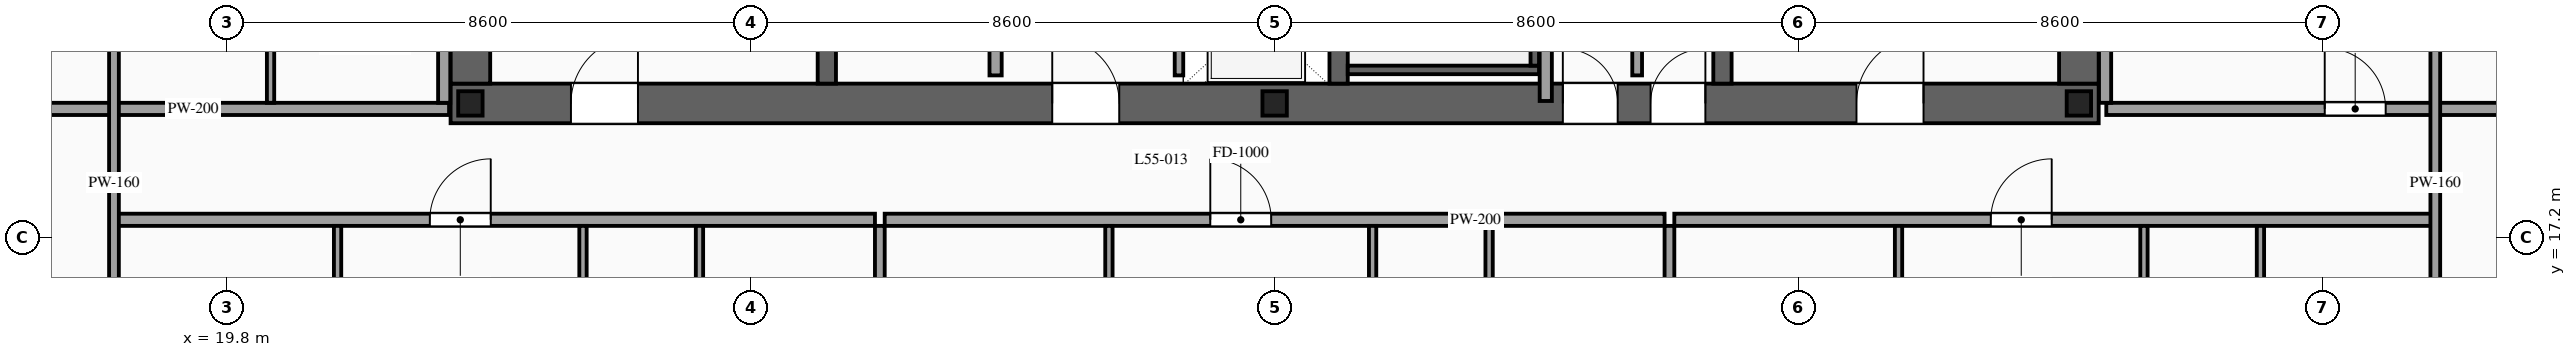
"""IFC4 building model, lengths in metres.
Left out: names, types, materials, properties, quantities, classifications, styles, units other than length and angle.
Written with IfcOpenShell. Run it as: python <this file> out.ifc"""

import sys

from ifc_helpers import new_model, si_unit, direction, frame, frame_2d, origin, origin_2d, place, context, subcontext, project, spatial, rectangle, i_section, extrude, source, transform, mapped, element, fill, save


model = new_model("IFC4")
c1 = context("Model", 3, precision=1e-05, world=origin(), true_north=direction((0.0, 1.0)))
c2 = subcontext(c1, "Body", "Model", "MODEL_VIEW")
j1 = project(units=[si_unit("LENGTHUNIT", "METRE"), si_unit("PLANEANGLEUNIT", "RADIAN")], contexts=[c1])
p1 = place(None, origin())
s1 = spatial("IfcSite", under=j1, at=p1, CompositionType="ELEMENT")
p2 = place(p1, origin())
s2 = spatial("IfcBuilding", under=s1, at=p2, CompositionType="ELEMENT")
p3 = place(p2, frame((0.0, 0.0, 209.0)))
s3 = spatial("IfcBuildingStorey", under=s2, at=p3, CompositionType="ELEMENT", Elevation=209.0)
p4 = place(p3, frame((23.475, 19.4, 0.0), z_axis=(0.0, 0.0, 1.0), x_axis=(1.0, 0.0, 0.0)))
e1 = element("IfcWall", 1, at=p4, inside=s3, PredefinedType="SHEAR", context=c2, shape_type="SweptSolid", body=[
    extrude(rectangle(XDim=27.05, YDim=0.65, at=frame_2d((13.525, 0.0))), origin(), (0.0, 0.0, 1.0), 3.5),
])
p5 = place(p4, frame((1.975, 0.0, 0.0)))
e2 = element("IfcOpeningElement", 2, at=p5, cuts=e1, PredefinedType="OPENING", context=c2, shape_type="SweptSolid", body=[
    extrude(rectangle(XDim=1.1, YDim=2.2, at=frame_2d((0.55, 1.1))), frame((0.0, 0.34, 0.0), z_axis=(0.0, -1.0, 0.0), x_axis=(1.0, 0.0, 0.0)), (0.0, 0.0, 1.0), 0.68),
])
p6 = place(p4, frame((9.875, 0.0, 0.0)))
e3 = element("IfcOpeningElement", 3, at=p6, cuts=e1, PredefinedType="OPENING", context=c2, shape_type="SweptSolid", body=[
    extrude(rectangle(XDim=1.1, YDim=2.2, at=frame_2d((0.55, 1.1))), frame((0.0, 0.34, 0.0), z_axis=(0.0, -1.0, 0.0), x_axis=(1.0, 0.0, 0.0)), (0.0, 0.0, 1.0), 0.68),
])
p7 = place(p4, frame((23.075, 0.0, 0.0)))
e4 = element("IfcOpeningElement", 4, at=p7, cuts=e1, PredefinedType="OPENING", context=c2, shape_type="SweptSolid", body=[
    extrude(rectangle(XDim=1.1, YDim=2.2, at=frame_2d((0.55, 1.1))), frame((0.0, 0.34, 0.0), z_axis=(0.0, -1.0, 0.0), x_axis=(1.0, 0.0, 0.0)), (0.0, 0.0, 1.0), 0.68),
])
p8 = place(p4, frame((19.695, 0.0, 0.0)))
e5 = element("IfcOpeningElement", 5, at=p8, cuts=e1, PredefinedType="OPENING", context=c2, shape_type="SweptSolid", body=[
    extrude(rectangle(XDim=0.9, YDim=2.15, at=frame_2d((0.45, 1.075))), frame((0.0, 0.34, 0.0), z_axis=(0.0, -1.0, 0.0), x_axis=(1.0, 0.0, 0.0)), (0.0, 0.0, 1.0), 0.68),
])
p9 = place(p4, frame((18.255, 0.0, 0.0)))
e6 = element("IfcOpeningElement", 6, at=p9, cuts=e1, PredefinedType="OPENING", context=c2, shape_type="SweptSolid", body=[
    extrude(rectangle(XDim=0.9, YDim=2.15, at=frame_2d((0.45, 1.075))), frame((0.0, 0.34, 0.0), z_axis=(0.0, -1.0, 0.0), x_axis=(1.0, 0.0, 0.0)), (0.0, 0.0, 1.0), 0.68),
])
m1 = source(origin(), c2, "Body", "SweptSolid", [
    extrude(rectangle(XDim=12.15, YDim=0.65, at=frame_2d((6.075, 0.0))), origin(), (0.0, 0.0, 1.0), 3.5),
])
for number, where, z_axis, x_axis in (
    (7, (23.8, 19.725, 0.0), (0.0, 0.0, 1.0), (0.0, 1.0, 0.0)),
    (8, (50.2, 19.725, 0.0), (0.0, 0.0, 1.0), (0.0, 1.0, 0.0)),
):
    element("IfcWall", number, at=place(p3, frame(where, z_axis=z_axis, x_axis=x_axis)), inside=s3, PredefinedType="SHEAR", context=c2, shape_type="MappedRepresentation", body=[
        mapped(m1, transform((0.0, 0.0, 0.0), scale=1.0)),
    ])
m2 = source(origin(), c2, "Body", "SweptSolid", [
    extrude(rectangle(XDim=12.15, YDim=0.3, at=frame_2d((6.075, 0.0))), origin(), (0.0, 0.0, 1.0), 3.5),
])
for number, where, z_axis, x_axis in (
    (9, (29.65, 19.725, 0.0), (0.0, 0.0, 1.0), (0.0, 1.0, 0.0)),
    (10, (38.05, 19.725, 0.0), (0.0, 0.0, 1.0), (0.0, 1.0, 0.0)),
    (11, (44.35, 19.725, 0.0), (0.0, 0.0, 1.0), (0.0, 1.0, 0.0)),
):
    element("IfcWall", number, at=place(p3, frame(where, z_axis=z_axis, x_axis=x_axis)), inside=s3, PredefinedType="SOLIDWALL", context=c2, shape_type="MappedRepresentation", body=[
        mapped(m2, transform((0.0, 0.0, 0.0), scale=1.0)),
    ])
m3 = source(origin(), c2, "Body", "SweptSolid", [
    extrude(i_section(OverallWidth=0.4, OverallDepth=0.4, WebThickness=0.013, FlangeThickness=0.021, at=origin_2d()), origin(), (0.0, 0.0, 1.0), 3.5),
])
for number, where, z_axis, x_axis in (
    (12, (23.8, 19.4, 0.0), (0.0, 0.0, 1.0), (1.0, 0.0, 0.0)),
    (13, (37.0, 19.4, 0.0), (0.0, 0.0, 1.0), (1.0, 0.0, 0.0)),
    (14, (50.2, 19.4, 0.0), (0.0, 0.0, 1.0), (1.0, 0.0, 0.0)),
):
    element("IfcColumn", number, at=place(p3, frame(where, z_axis=z_axis, x_axis=x_axis)), inside=s3, PredefinedType="COLUMN", context=c2, shape_type="MappedRepresentation", body=[
        mapped(m3, transform((0.0, 0.0, 0.0), scale=1.0)),
    ])
p10 = place(p3, frame((35.43, 19.86, 0.0), z_axis=(0.0, 0.0, 1.0), x_axis=(0.0, 1.0, 0.0)))
e15 = element("IfcWall", 15, at=p10, inside=s3, PredefinedType="SOLIDWALL", context=c2, shape_type="SweptSolid", body=[
    extrude(rectangle(XDim=2.04, YDim=0.14, at=frame_2d((1.02, 0.0))), origin(), (0.0, 0.0, 1.0), 3.28),
])
p11 = place(p10, frame((0.47, 0.0, 0.0)))
e16 = element("IfcOpeningElement", 16, at=p11, cuts=e15, PredefinedType="OPENING", context=c2, shape_type="SweptSolid", body=[
    extrude(rectangle(XDim=1.1, YDim=2.2, at=frame_2d((0.55, 1.1))), frame((0.0, 0.085, 0.0), z_axis=(0.0, -1.0, 0.0), x_axis=(1.0, 0.0, 0.0)), (0.0, 0.0, 1.0), 0.17),
])
m4 = source(origin(), c2, "Body", "SweptSolid", [
    extrude(rectangle(XDim=3.14, YDim=0.14, at=frame_2d((1.57, 0.0))), origin(), (0.0, 0.0, 1.0), 3.28),
])
p12 = place(p3, frame((38.2, 19.95, 0.0), z_axis=(0.0, 0.0, 1.0), x_axis=(1.0, 0.0, 0.0)))
e17 = element("IfcWall", 17, at=p12, inside=s3, PredefinedType="SOLIDWALL", context=c2, shape_type="MappedRepresentation", body=[
    mapped(m4, transform((0.0, 0.0, 0.0), scale=1.0)),
])
m5 = source(origin(), c2, "Body", "SweptSolid", [
    extrude(rectangle(XDim=8.94, YDim=0.14, at=frame_2d((4.47, 0.0))), origin(), (0.0, 0.0, 1.0), 3.28),
])
p13 = place(p3, frame((41.27, 20.02, 0.0), z_axis=(0.0, 0.0, 1.0), x_axis=(0.0, 1.0, 0.0)))
e18 = element("IfcWall", 18, at=p13, inside=s3, PredefinedType="SOLIDWALL", context=c2, shape_type="MappedRepresentation", body=[
    mapped(m5, transform((0.0, 0.0, 0.0), scale=1.0)),
])
p14 = place(p3, frame((32.42, 19.86, 0.0), z_axis=(0.0, 0.0, 1.0), x_axis=(0.0, 1.0, 0.0)))
e19 = element("IfcWall", 19, at=p14, inside=s3, PredefinedType="PARTITIONING", context=c2, shape_type="SweptSolid", body=[
    extrude(rectangle(XDim=11.88, YDim=0.2, at=frame_2d((5.94, 0.0))), origin(), (0.0, 0.0, 1.0), 3.28),
])
p15 = place(p14, frame((5.49, 0.0, 0.0)))
e20 = element("IfcOpeningElement", 20, at=p15, cuts=e19, PredefinedType="OPENING", context=c2, shape_type="SweptSolid", body=[
    extrude(rectangle(XDim=0.9, YDim=2.15, at=frame_2d((0.45, 1.075))), frame((0.0, 0.115, 0.0), z_axis=(0.0, -1.0, 0.0), x_axis=(1.0, 0.0, 0.0)), (0.0, 0.0, 1.0), 0.23),
])
m6 = source(origin(), c2, "Body", "SweptSolid", [
    extrude(rectangle(XDim=1.34, YDim=0.16, at=frame_2d((0.67, 0.0))), origin(), (0.0, 0.0, 1.0), 3.28),
])
p16 = place(p3, frame((42.95, 19.86, 0.0), z_axis=(0.0, 0.0, 1.0), x_axis=(0.0, 1.0, 0.0)))
e21 = element("IfcWall", 21, at=p16, inside=s3, PredefinedType="PARTITIONING", context=c2, shape_type="MappedRepresentation", body=[
    mapped(m6, transform((0.0, 0.0, 0.0), scale=1.0)),
])
m7 = source(origin(), c2, "Body", "SweptSolid", [
    extrude(rectangle(XDim=12.72, YDim=0.2, at=frame_2d((6.36, 0.0))), origin(), (0.0, 0.0, 1.0), 3.28),
])
p17 = place(p3, frame((41.45, 19.44, 0.0), z_axis=(0.0, 0.0, 1.0), x_axis=(0.0, 1.0, 0.0)))
e22 = element("IfcWall", 22, at=p17, inside=s3, PredefinedType="PARTITIONING", context=c2, shape_type="MappedRepresentation", body=[
    mapped(m7, transform((0.0, 0.0, 0.0), scale=1.0)),
])
p18 = place(p3, frame((17.94, 17.49, 0.0), z_axis=(0.0, 0.0, 1.0), x_axis=(1.0, 0.0, 0.0)))
e23 = element("IfcWall", 23, at=p18, inside=s3, PredefinedType="PARTITIONING", context=c2, shape_type="SweptSolid", body=[
    extrude(rectangle(XDim=12.5, YDim=0.2, at=frame_2d((6.25, 0.0))), origin(), (0.0, 0.0, 1.0), 3.28),
])
p19 = place(p18, frame((5.194, 0.0, 0.0)))
e24 = element("IfcOpeningElement", 24, at=p19, cuts=e23, PredefinedType="OPENING", context=c2, shape_type="SweptSolid", body=[
    extrude(rectangle(XDim=1.0, YDim=2.2, at=frame_2d((0.5, 1.1))), frame((0.0, 0.115, 0.0), z_axis=(0.0, -1.0, 0.0), x_axis=(1.0, 0.0, 0.0)), (0.0, 0.0, 1.0), 0.23),
])
m8 = source(origin(), c2, "Body", "SweptSolid", [
    extrude(rectangle(XDim=13.54, YDim=0.16, at=frame_2d((6.77, 0.0))), origin(), (0.0, 0.0, 1.0), 3.28),
])
p20 = place(p3, frame((30.52, 3.85, 0.0), z_axis=(0.0, 0.0, 1.0), x_axis=(0.0, 1.0, 0.0)))
e25 = element("IfcWall", 25, at=p20, inside=s3, PredefinedType="PARTITIONING", context=c2, shape_type="MappedRepresentation", body=[
    mapped(m8, transform((0.0, 0.0, 0.0), scale=1.0)),
])
m9 = source(origin(), c2, "Body", "SweptSolid", [
    extrude(rectangle(XDim=5.61, YDim=0.12, at=frame_2d((2.805, 0.0))), origin(), (0.0, 0.0, 1.0), 3.28),
])
p21 = place(p3, frame((21.62, 11.78, 0.0), z_axis=(0.0, 0.0, 1.0), x_axis=(0.0, 1.0, 0.0)))
e26 = element("IfcWall", 26, at=p21, inside=s3, PredefinedType="PARTITIONING", context=c2, shape_type="MappedRepresentation", body=[
    mapped(m9, transform((0.0, 0.0, 0.0), scale=1.0)),
])
p22 = place(p3, frame((27.56, 11.78, 0.0), z_axis=(0.0, 0.0, 1.0), x_axis=(0.0, 1.0, 0.0)))
e27 = element("IfcWall", 27, at=p22, inside=s3, PredefinedType="PARTITIONING", context=c2, shape_type="SweptSolid", body=[
    extrude(rectangle(XDim=5.61, YDim=0.12, at=frame_2d((2.805, 0.0))), origin(), (0.0, 0.0, 1.0), 3.28),
])
p23 = place(p22, frame((2.38, 0.0, 0.0)))
e28 = element("IfcOpeningElement", 28, at=p23, cuts=e27, PredefinedType="OPENING", context=c2, shape_type="SweptSolid", body=[
    extrude(rectangle(XDim=0.85, YDim=2.1, at=frame_2d((0.425, 1.05))), frame((0.0, 0.075, 0.0), z_axis=(0.0, -1.0, 0.0), x_axis=(1.0, 0.0, 0.0)), (0.0, 0.0, 1.0), 0.15),
])
p24 = place(p3, frame((25.648, 11.78, 0.0), z_axis=(0.0, 0.0, 1.0), x_axis=(0.0, 1.0, 0.0)))
e29 = element("IfcWall", 29, at=p24, inside=s3, PredefinedType="PARTITIONING", context=c2, shape_type="SweptSolid", body=[
    extrude(rectangle(XDim=5.61, YDim=0.12, at=frame_2d((2.805, 0.0))), origin(), (0.0, 0.0, 1.0), 3.28),
])
p25 = place(p24, frame((2.38, 0.0, 0.0)))
e30 = element("IfcOpeningElement", 30, at=p25, cuts=e29, PredefinedType="OPENING", context=c2, shape_type="SweptSolid", body=[
    extrude(rectangle(XDim=0.85, YDim=2.1, at=frame_2d((0.425, 1.05))), frame((0.0, 0.075, 0.0), z_axis=(0.0, -1.0, 0.0), x_axis=(1.0, 0.0, 0.0)), (0.0, 0.0, 1.0), 0.15),
])
p26 = place(p3, frame((30.6, 17.49, 0.0), z_axis=(0.0, 0.0, 1.0), x_axis=(1.0, 0.0, 0.0)))
e31 = element("IfcWall", 31, at=p26, inside=s3, PredefinedType="PARTITIONING", context=c2, shape_type="SweptSolid", body=[
    extrude(rectangle(XDim=12.8, YDim=0.2, at=frame_2d((6.4, 0.0))), origin(), (0.0, 0.0, 1.0), 3.28),
])
p27 = place(p26, frame((5.344, 0.0, 0.0)))
e32 = element("IfcOpeningElement", 32, at=p27, cuts=e31, PredefinedType="OPENING", context=c2, shape_type="SweptSolid", body=[
    extrude(rectangle(XDim=1.0, YDim=2.2, at=frame_2d((0.5, 1.1))), frame((0.0, 0.115, 0.0), z_axis=(0.0, -1.0, 0.0), x_axis=(1.0, 0.0, 0.0)), (0.0, 0.0, 1.0), 0.23),
])
p28 = place(p3, frame((43.48, 3.85, 0.0), z_axis=(0.0, 0.0, 1.0), x_axis=(0.0, 1.0, 0.0)))
e33 = element("IfcWall", 33, at=p28, inside=s3, PredefinedType="PARTITIONING", context=c2, shape_type="MappedRepresentation", body=[
    mapped(m8, transform((0.0, 0.0, 0.0), scale=1.0)),
])
p29 = place(p3, frame((34.28, 11.78, 0.0), z_axis=(0.0, 0.0, 1.0), x_axis=(0.0, 1.0, 0.0)))
e34 = element("IfcWall", 34, at=p29, inside=s3, PredefinedType="PARTITIONING", context=c2, shape_type="MappedRepresentation", body=[
    mapped(m9, transform((0.0, 0.0, 0.0), scale=1.0)),
])
p30 = place(p3, frame((40.52, 11.78, 0.0), z_axis=(0.0, 0.0, 1.0), x_axis=(0.0, 1.0, 0.0)))
e35 = element("IfcWall", 35, at=p30, inside=s3, PredefinedType="PARTITIONING", context=c2, shape_type="SweptSolid", body=[
    extrude(rectangle(XDim=5.61, YDim=0.12, at=frame_2d((2.805, 0.0))), origin(), (0.0, 0.0, 1.0), 3.28),
])
p31 = place(p30, frame((2.38, 0.0, 0.0)))
e36 = element("IfcOpeningElement", 36, at=p31, cuts=e35, PredefinedType="OPENING", context=c2, shape_type="SweptSolid", body=[
    extrude(rectangle(XDim=0.85, YDim=2.1, at=frame_2d((0.425, 1.05))), frame((0.0, 0.075, 0.0), z_axis=(0.0, -1.0, 0.0), x_axis=(1.0, 0.0, 0.0)), (0.0, 0.0, 1.0), 0.15),
])
p32 = place(p3, frame((38.608, 11.78, 0.0), z_axis=(0.0, 0.0, 1.0), x_axis=(0.0, 1.0, 0.0)))
e37 = element("IfcWall", 37, at=p32, inside=s3, PredefinedType="PARTITIONING", context=c2, shape_type="SweptSolid", body=[
    extrude(rectangle(XDim=5.61, YDim=0.12, at=frame_2d((2.805, 0.0))), origin(), (0.0, 0.0, 1.0), 3.28),
])
p33 = place(p32, frame((2.38, 0.0, 0.0)))
e38 = element("IfcOpeningElement", 38, at=p33, cuts=e37, PredefinedType="OPENING", context=c2, shape_type="SweptSolid", body=[
    extrude(rectangle(XDim=0.85, YDim=2.1, at=frame_2d((0.425, 1.05))), frame((0.0, 0.075, 0.0), z_axis=(0.0, -1.0, 0.0), x_axis=(1.0, 0.0, 0.0)), (0.0, 0.0, 1.0), 0.15),
])
p34 = place(p3, frame((43.56, 17.49, 0.0), z_axis=(0.0, 0.0, 1.0), x_axis=(1.0, 0.0, 0.0)))
e39 = element("IfcWall", 39, at=p34, inside=s3, PredefinedType="PARTITIONING", context=c2, shape_type="SweptSolid", body=[
    extrude(rectangle(XDim=12.5, YDim=0.2, at=frame_2d((6.25, 0.0))), origin(), (0.0, 0.0, 1.0), 3.28),
])
p35 = place(p34, frame((5.194, 0.0, 0.0)))
e40 = element("IfcOpeningElement", 40, at=p35, cuts=e39, PredefinedType="OPENING", context=c2, shape_type="SweptSolid", body=[
    extrude(rectangle(XDim=1.0, YDim=2.2, at=frame_2d((0.5, 1.1))), frame((0.0, 0.115, 0.0), z_axis=(0.0, -1.0, 0.0), x_axis=(1.0, 0.0, 0.0)), (0.0, 0.0, 1.0), 0.23),
])
p36 = place(p3, frame((47.24, 11.78, 0.0), z_axis=(0.0, 0.0, 1.0), x_axis=(0.0, 1.0, 0.0)))
e41 = element("IfcWall", 41, at=p36, inside=s3, PredefinedType="PARTITIONING", context=c2, shape_type="MappedRepresentation", body=[
    mapped(m9, transform((0.0, 0.0, 0.0), scale=1.0)),
])
p37 = place(p3, frame((53.18, 11.78, 0.0), z_axis=(0.0, 0.0, 1.0), x_axis=(0.0, 1.0, 0.0)))
e42 = element("IfcWall", 42, at=p37, inside=s3, PredefinedType="PARTITIONING", context=c2, shape_type="SweptSolid", body=[
    extrude(rectangle(XDim=5.61, YDim=0.12, at=frame_2d((2.805, 0.0))), origin(), (0.0, 0.0, 1.0), 3.28),
])
p38 = place(p37, frame((2.38, 0.0, 0.0)))
e43 = element("IfcOpeningElement", 43, at=p38, cuts=e42, PredefinedType="OPENING", context=c2, shape_type="SweptSolid", body=[
    extrude(rectangle(XDim=0.85, YDim=2.1, at=frame_2d((0.425, 1.05))), frame((0.0, 0.075, 0.0), z_axis=(0.0, -1.0, 0.0), x_axis=(1.0, 0.0, 0.0)), (0.0, 0.0, 1.0), 0.15),
])
p39 = place(p3, frame((51.268, 11.78, 0.0), z_axis=(0.0, 0.0, 1.0), x_axis=(0.0, 1.0, 0.0)))
e44 = element("IfcWall", 44, at=p39, inside=s3, PredefinedType="PARTITIONING", context=c2, shape_type="SweptSolid", body=[
    extrude(rectangle(XDim=5.61, YDim=0.12, at=frame_2d((2.805, 0.0))), origin(), (0.0, 0.0, 1.0), 3.28),
])
p40 = place(p39, frame((2.38, 0.0, 0.0)))
e45 = element("IfcOpeningElement", 45, at=p40, cuts=e44, PredefinedType="OPENING", context=c2, shape_type="SweptSolid", body=[
    extrude(rectangle(XDim=0.85, YDim=2.1, at=frame_2d((0.425, 1.05))), frame((0.0, 0.075, 0.0), z_axis=(0.0, -1.0, 0.0), x_axis=(1.0, 0.0, 0.0)), (0.0, 0.0, 1.0), 0.15),
])
m10 = source(origin(), c2, "Body", "SweptSolid", [
    extrude(rectangle(XDim=8.4, YDim=0.2, at=frame_2d((4.2, 0.0))), origin(), (0.0, 0.0, 1.0), 2.775),
])
p41 = place(p3, frame((15.05, 19.31, 0.0), z_axis=(0.0, 0.0, 1.0), x_axis=(1.0, 0.0, 0.0)))
e46 = element("IfcWall", 46, at=p41, inside=s3, PredefinedType="PARTITIONING", context=c2, shape_type="MappedRepresentation", body=[
    mapped(m10, transform((0.0, 0.0, 0.0), scale=1.0)),
])
m11 = source(origin(), c2, "Body", "SweptSolid", [
    extrude(rectangle(XDim=12.78, YDim=0.2, at=frame_2d((6.39, 0.0))), origin(), (0.0, 0.0, 1.0), 3.28),
])
p42 = place(p3, frame((23.37, 19.41, 0.0), z_axis=(0.0, 0.0, 1.0), x_axis=(0.0, 1.0, 0.0)))
e47 = element("IfcWall", 47, at=p42, inside=s3, PredefinedType="PARTITIONING", context=c2, shape_type="MappedRepresentation", body=[
    mapped(m11, transform((0.0, 0.0, 0.0), scale=1.0)),
])
p43 = place(p3, frame((20.52, 19.41, 0.0), z_axis=(0.0, 0.0, 1.0), x_axis=(0.0, 1.0, 0.0)))
e48 = element("IfcWall", 48, at=p43, inside=s3, PredefinedType="PARTITIONING", context=c2, shape_type="SweptSolid", body=[
    extrude(rectangle(XDim=5.623, YDim=0.12, at=frame_2d((2.812, 0.0))), origin(), (0.0, 0.0, 1.0), 3.28),
])
p44 = place(p43, frame((2.386, 0.0, 0.0)))
e49 = element("IfcOpeningElement", 49, at=p44, cuts=e48, PredefinedType="OPENING", context=c2, shape_type="SweptSolid", body=[
    extrude(rectangle(XDim=0.85, YDim=2.1, at=frame_2d((0.425, 1.05))), frame((0.0, 0.075, 0.0), z_axis=(0.0, -1.0, 0.0), x_axis=(1.0, 0.0, 0.0)), (0.0, 0.0, 1.0), 0.15),
])
p45 = place(p3, frame((50.65, 19.31, 0.0), z_axis=(0.0, 0.0, 1.0), x_axis=(1.0, 0.0, 0.0)))
e50 = element("IfcWall", 50, at=p45, inside=s3, PredefinedType="PARTITIONING", context=c2, shape_type="SweptSolid", body=[
    extrude(rectangle(XDim=8.3, YDim=0.2, at=frame_2d((4.15, 0.0))), origin(), (0.0, 0.0, 1.0), 2.775),
])
p46 = place(p45, frame((3.585, 0.0, 0.0)))
e51 = element("IfcOpeningElement", 51, at=p46, cuts=e50, PredefinedType="OPENING", context=c2, shape_type="SweptSolid", body=[
    extrude(rectangle(XDim=1.0, YDim=2.2, at=frame_2d((0.5, 1.1))), frame((0.0, 0.115, 0.0), z_axis=(0.0, -1.0, 0.0), x_axis=(1.0, 0.0, 0.0)), (0.0, 0.0, 1.0), 0.23),
])
m12 = source(origin(), c2, "Body", "SweptSolid", [
    extrude(rectangle(XDim=6.29, YDim=0.2, at=frame_2d((3.145, 0.0))), origin(), (0.0, 0.0, 1.0), 3.28),
])
p47 = place(p3, frame((50.63, 19.41, 0.0), z_axis=(0.0, 0.0, 1.0), x_axis=(0.0, 1.0, 0.0)))
e52 = element("IfcWall", 52, at=p47, inside=s3, PredefinedType="PARTITIONING", context=c2, shape_type="MappedRepresentation", body=[
    mapped(m12, transform((0.0, 0.0, 0.0), scale=1.0)),
])
m13 = source(origin(), c2, "Body", "SweptSolid", [
    extrude(rectangle(XDim=28.19, YDim=0.16, at=frame_2d((14.095, 0.0))), origin(), (0.0, 0.0, 1.0), 3.28),
])
for number, where, z_axis, x_axis in (
    (53, (17.95, 4.0, 0.0), (0.0, 0.0, 1.0), (0.0, 1.0, 0.0)),
    (54, (56.05, 4.0, 0.0), (0.0, 0.0, 1.0), (0.0, 1.0, 0.0)),
):
    element("IfcWall", number, at=place(p3, frame(where, z_axis=z_axis, x_axis=x_axis)), inside=s3, PredefinedType="PARTITIONING", context=c2, shape_type="MappedRepresentation", body=[
        mapped(m13, transform((0.0, 0.0, 0.0), scale=1.0)),
    ])
m14 = source(origin(), c2, "Body", "SweptSolid", [
    extrude(rectangle(XDim=1.1, YDim=2.2, at=frame_2d((0.55, 1.1))), frame((0.0, 0.025, 0.0), z_axis=(0.0, -1.0, 0.0), x_axis=(1.0, 0.0, 0.0)), (0.0, 0.0, 1.0), 0.05),
])
p48 = place(p5, origin())
e55 = element("IfcDoor", 55, at=p48, inside=s3, OperationType="SINGLE_SWING_RIGHT", PredefinedType="DOOR", context=c2, shape_type="MappedRepresentation", body=[
    mapped(m14, transform((0.0, 0.0, 0.0), scale=1.0)),
])
fill(e2, e55)
p49 = place(p6, origin())
e56 = element("IfcDoor", 56, at=p49, inside=s3, OperationType="SINGLE_SWING_LEFT", PredefinedType="DOOR", context=c2, shape_type="MappedRepresentation", body=[
    mapped(m14, transform((0.0, 0.0, 0.0), scale=1.0)),
])
fill(e3, e56)
p50 = place(p7, origin())
e57 = element("IfcDoor", 57, at=p50, inside=s3, OperationType="SINGLE_SWING_RIGHT", PredefinedType="DOOR", context=c2, shape_type="MappedRepresentation", body=[
    mapped(m14, transform((0.0, 0.0, 0.0), scale=1.0)),
])
fill(e4, e57)
m15 = source(origin(), c2, "Body", "SweptSolid", [
    extrude(rectangle(XDim=0.9, YDim=2.15, at=frame_2d((0.45, 1.075))), frame((0.0, 0.025, 0.0), z_axis=(0.0, -1.0, 0.0), x_axis=(1.0, 0.0, 0.0)), (0.0, 0.0, 1.0), 0.05),
])
p51 = place(p8, origin())
e58 = element("IfcDoor", 58, at=p51, inside=s3, OperationType="SINGLE_SWING_RIGHT", PredefinedType="DOOR", context=c2, shape_type="MappedRepresentation", body=[
    mapped(m15, transform((0.0, 0.0, 0.0), scale=1.0)),
])
fill(e5, e58)
p52 = place(p9, origin())
e59 = element("IfcDoor", 59, at=p52, inside=s3, OperationType="SINGLE_SWING_LEFT", PredefinedType="DOOR", context=c2, shape_type="MappedRepresentation", body=[
    mapped(m15, transform((0.0, 0.0, 0.0), scale=1.0)),
])
fill(e6, e59)
m16 = source(origin(), c2, "Body", "SweptSolid", [
    extrude(rectangle(XDim=1.0, YDim=2.2, at=frame_2d((0.5, 1.1))), frame((0.0, 0.025, 0.0), z_axis=(0.0, -1.0, 0.0), x_axis=(1.0, 0.0, 0.0)), (0.0, 0.0, 1.0), 0.05),
])
p53 = place(p19, origin())
e60 = element("IfcDoor", 60, at=p53, inside=s3, OperationType="SINGLE_SWING_RIGHT", PredefinedType="DOOR", context=c2, shape_type="MappedRepresentation", body=[
    mapped(m16, transform((0.0, 0.0, 0.0), scale=1.0)),
])
fill(e24, e60)
p54 = place(p27, origin())
e61 = element("IfcDoor", 61, at=p54, inside=s3, OperationType="SINGLE_SWING_LEFT", PredefinedType="DOOR", context=c2, shape_type="MappedRepresentation", body=[
    mapped(m16, transform((0.0, 0.0, 0.0), scale=1.0)),
])
fill(e32, e61)
p55 = place(p35, origin())
e62 = element("IfcDoor", 62, at=p55, inside=s3, OperationType="SINGLE_SWING_RIGHT", PredefinedType="DOOR", context=c2, shape_type="MappedRepresentation", body=[
    mapped(m16, transform((0.0, 0.0, 0.0), scale=1.0)),
])
fill(e40, e62)
p56 = place(p46, origin())
e63 = element("IfcDoor", 63, at=p56, inside=s3, OperationType="SINGLE_SWING_LEFT", PredefinedType="DOOR", context=c2, shape_type="MappedRepresentation", body=[
    mapped(m16, transform((0.0, 0.0, 0.0), scale=1.0)),
])
fill(e51, e63)
save(model, sys.argv[1])
